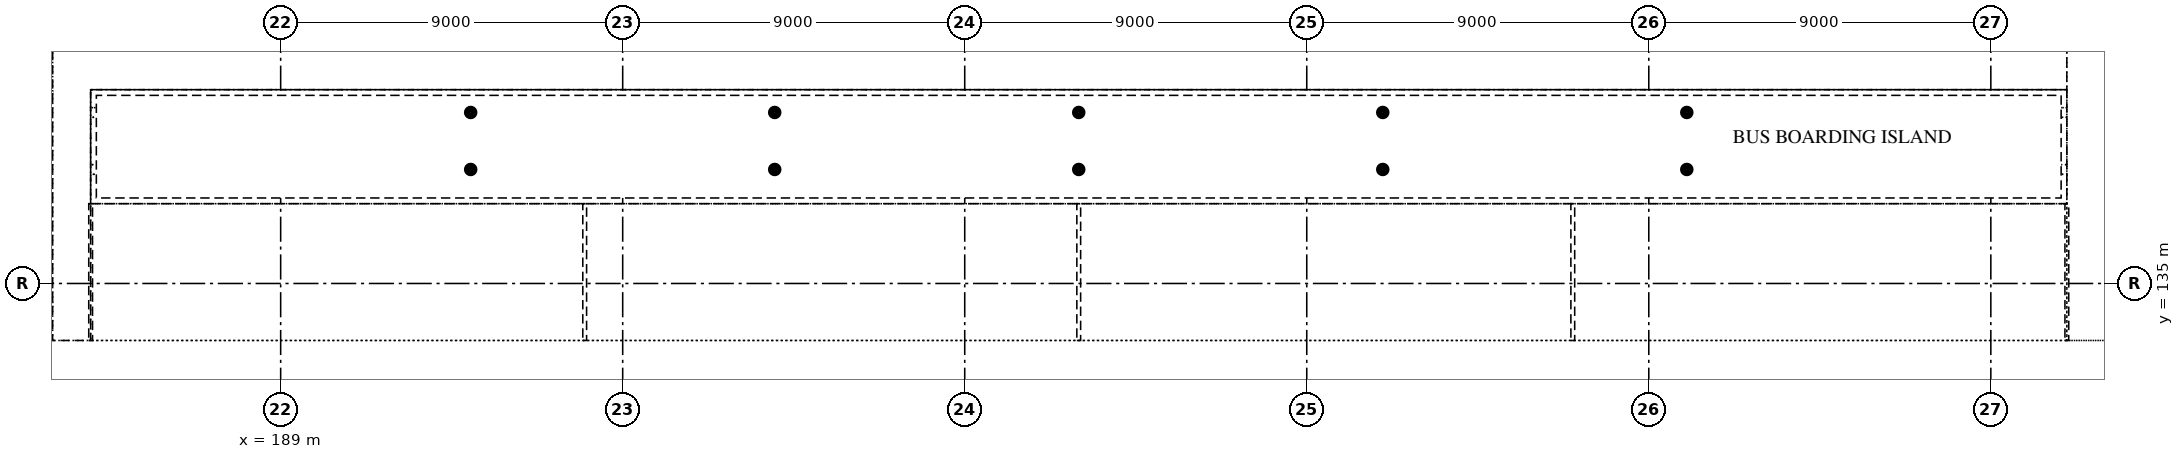
"""IFC4 building model, lengths in metres.
Left out: names, types, materials, properties, quantities, classifications, styles, units other than length and angle.
Written with IfcOpenShell. Run it as: python <this file> out.ifc"""

import sys

from ifc_helpers import new_model, si_unit, direction, frame, origin, origin_2d, place, context, subcontext, project, spatial, hollow_circle, extrude, element, save


model = new_model("IFC4")
c1 = context("Model", 3, precision=1e-05, world=origin(), true_north=direction((0.0, 1.0)))
c2 = subcontext(c1, "Body", "Model", "MODEL_VIEW")
j1 = project(units=[si_unit("LENGTHUNIT", "METRE"), si_unit("PLANEANGLEUNIT", "RADIAN")], contexts=[c1])
p1 = place(None, origin())
s1 = spatial("IfcSite", under=j1, at=p1, CompositionType="ELEMENT")
p2 = place(p1, origin())
s2 = spatial("IfcBuilding", under=s1, at=p2, CompositionType="ELEMENT")
p3 = place(p2, origin())
s3 = spatial("IfcBuildingStorey", under=s2, at=p3, CompositionType="ELEMENT", Elevation=0.0)
for number, where, z_axis, x_axis in (
    (1, (194.0, 138.0, -2.1), (0.0, 0.0, 1.0), (1.0, 0.0, 0.0)),
    (2, (202.0, 138.0, -2.1), (0.0, 0.0, 1.0), (1.0, 0.0, 0.0)),
    (3, (210.0, 138.0, -2.1), (0.0, 0.0, 1.0), (1.0, 0.0, 0.0)),
    (4, (218.0, 138.0, -2.1), (0.0, 0.0, 1.0), (1.0, 0.0, 0.0)),
    (5, (226.0, 138.0, -2.1), (0.0, 0.0, 1.0), (1.0, 0.0, 0.0)),
):
    element("IfcColumn", number, at=place(p3, frame(where, z_axis=z_axis, x_axis=x_axis)), inside=s3, PredefinedType="COLUMN", context=c2, shape_type="SweptSolid", body=[
        extrude(hollow_circle(Radius=0.097, WallThickness=0.008, at=origin_2d()), origin(), (0.0, 0.0, 1.0), 6.66),
    ])
for number, where, z_axis, x_axis in (
    (6, (194.0, 139.5, -2.1), (0.0, 0.0, 1.0), (1.0, 0.0, 0.0)),
    (7, (202.0, 139.5, -2.1), (0.0, 0.0, 1.0), (1.0, 0.0, 0.0)),
    (8, (210.0, 139.5, -2.1), (0.0, 0.0, 1.0), (1.0, 0.0, 0.0)),
    (9, (218.0, 139.5, -2.1), (0.0, 0.0, 1.0), (1.0, 0.0, 0.0)),
    (10, (226.0, 139.5, -2.1), (0.0, 0.0, 1.0), (1.0, 0.0, 0.0)),
):
    element("IfcColumn", number, at=place(p3, frame(where, z_axis=z_axis, x_axis=x_axis)), inside=s3, PredefinedType="COLUMN", context=c2, shape_type="SweptSolid", body=[
        extrude(hollow_circle(Radius=0.097, WallThickness=0.008, at=origin_2d()), origin(), (0.0, 0.0, 1.0), 6.57),
    ])
save(model, sys.argv[1])
